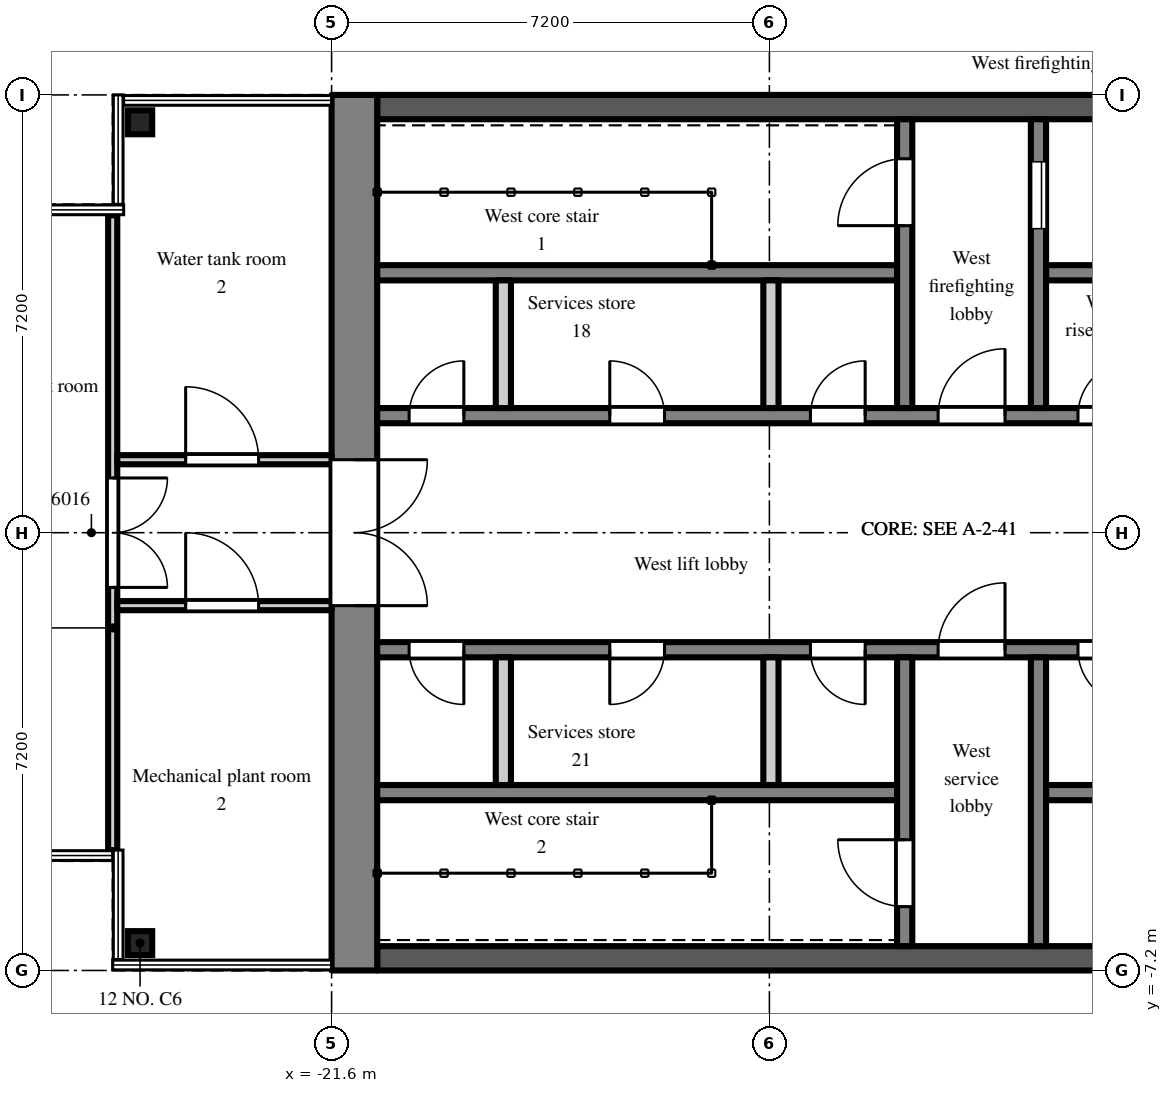
"""IFC4 building model, lengths in metres.
Left out: names, types, materials, properties, quantities, classifications, styles, units other than length and angle.
Written with IfcOpenShell. Run it as: python <this file> out.ifc"""

import sys

from ifc_helpers import new_model, si_unit, direction, frame, frame_2d, origin, origin_2d, place, context, subcontext, project, spatial, polyline, rectangle, i_section, outline, extrude, element, fill, save


model = new_model("IFC4")
c1 = context("Model", 3, precision=1e-05, world=origin(), true_north=direction((0.0, 1.0)))
c2 = subcontext(c1, "Body", "Model", "MODEL_VIEW")
j1 = project(units=[si_unit("LENGTHUNIT", "METRE"), si_unit("PLANEANGLEUNIT", "RADIAN")], contexts=[c1])
p1 = place(None, origin())
s1 = spatial("IfcSite", under=j1, at=p1, CompositionType="ELEMENT")
p2 = place(p1, origin())
s2 = spatial("IfcBuilding", under=s1, at=p2, CompositionType="ELEMENT")
p3 = place(p2, frame((0.0, 0.0, 247.5)))
s3 = spatial("IfcBuildingStorey", under=s2, at=p3, CompositionType="ELEMENT", Elevation=247.5)
for number, where, z_axis, x_axis in (
    (1, (-24.75, -6.75, 0.0), (0.0, 0.0, 1.0), (1.0, 0.0, 0.0)),
    (2, (-24.75, 6.75, 0.0), (0.0, 0.0, 1.0), (1.0, 0.0, 0.0)),
):
    element("IfcColumn", number, at=place(p3, frame(where, z_axis=z_axis, x_axis=x_axis)), inside=s3, PredefinedType="COLUMN", context=c2, shape_type="SweptSolid", body=[
        extrude(i_section(OverallWidth=0.399, OverallDepth=0.394, WebThickness=0.023, FlangeThickness=0.037, FilletRadius=0.015, at=origin_2d()), origin(), (0.0, 0.0, 1.0), 9.812),
    ])
p4 = place(p3, frame((-21.225, -7.2, 0.0), z_axis=(0.0, 0.0, 1.0), x_axis=(0.0, 1.0, 0.0)))
e3 = element("IfcWall", 3, at=p4, inside=s3, PredefinedType="SHEAR", context=c2, shape_type="SweptSolid", body=[
    extrude(outline(polyline([(0.0, 0.0), (14.4, 0.0), (14.4, 10.033), (7.2, 13.7), (0.0, 10.033), (0.0, 0.0)])), frame((0.0, 0.375, 0.0), z_axis=(0.0, -1.0, 0.0), x_axis=(1.0, 0.0, 0.0)), (0.0, 0.0, 1.0), 0.75),
])
p5 = place(p4, frame((6.0, 0.0, 0.0)))
e4 = element("IfcOpeningElement", 4, at=p5, cuts=e3, PredefinedType="OPENING", context=c2, shape_type="SweptSolid", body=[
    extrude(rectangle(XDim=2.4, YDim=2.2, at=frame_2d((1.2, 1.1))), frame((0.0, 0.385, 0.0), z_axis=(0.0, -1.0, 0.0), x_axis=(1.0, 0.0, 0.0)), (0.0, 0.0, 1.0), 0.77),
])
p6 = place(p3, frame((-7.9, 7.0, 0.0), z_axis=(0.0, 0.0, 1.0), x_axis=(-1.0, 0.0, 0.0)))
e5 = element("IfcWall", 5, at=p6, inside=s3, PredefinedType="SHEAR", context=c2, shape_type="SweptSolid", body=[
    extrude(rectangle(XDim=12.95, YDim=0.4, at=frame_2d((6.475, 0.0))), origin(), (0.0, 0.0, 1.0), 10.135),
])
p7 = place(p3, frame((-7.9, 1.925, 0.0), z_axis=(0.0, 0.0, 1.0), x_axis=(-1.0, 0.0, 0.0)))
e6 = element("IfcWall", 6, at=p7, inside=s3, PredefinedType="SHEAR", context=c2, shape_type="SweptSolid", body=[
    extrude(rectangle(XDim=12.95, YDim=0.25, at=frame_2d((6.475, 0.0))), origin(), (0.0, 0.0, 1.0), 12.72),
])
p8 = place(p7, frame((0.525, 0.0, 0.0)))
e7 = element("IfcOpeningElement", 7, at=p8, cuts=e6, PredefinedType="OPENING", context=c2, shape_type="SweptSolid", body=[
    extrude(rectangle(XDim=0.9, YDim=2.1, at=frame_2d((0.45, 1.05))), frame((0.0, 0.135, 0.0), z_axis=(0.0, -1.0, 0.0), x_axis=(1.0, 0.0, 0.0)), (0.0, 0.0, 1.0), 0.27),
])
p9 = place(p7, frame((2.625, 0.0, 0.0)))
e8 = element("IfcOpeningElement", 8, at=p9, cuts=e6, PredefinedType="OPENING", context=c2, shape_type="SweptSolid", body=[
    extrude(rectangle(XDim=1.1, YDim=2.1, at=frame_2d((0.55, 1.05))), frame((0.0, 0.135, 0.0), z_axis=(0.0, -1.0, 0.0), x_axis=(1.0, 0.0, 0.0)), (0.0, 0.0, 1.0), 0.27),
])
p10 = place(p7, frame((4.925, 0.0, 0.0)))
e9 = element("IfcOpeningElement", 9, at=p10, cuts=e6, PredefinedType="OPENING", context=c2, shape_type="SweptSolid", body=[
    extrude(rectangle(XDim=0.9, YDim=2.1, at=frame_2d((0.45, 1.05))), frame((0.0, 0.135, 0.0), z_axis=(0.0, -1.0, 0.0), x_axis=(1.0, 0.0, 0.0)), (0.0, 0.0, 1.0), 0.27),
])
p11 = place(p7, frame((8.225, 0.0, 0.0)))
e10 = element("IfcOpeningElement", 10, at=p11, cuts=e6, PredefinedType="OPENING", context=c2, shape_type="SweptSolid", body=[
    extrude(rectangle(XDim=0.9, YDim=2.1, at=frame_2d((0.45, 1.05))), frame((0.0, 0.135, 0.0), z_axis=(0.0, -1.0, 0.0), x_axis=(1.0, 0.0, 0.0)), (0.0, 0.0, 1.0), 0.27),
])
p12 = place(p7, frame((11.525, 0.0, 0.0)))
e11 = element("IfcOpeningElement", 11, at=p12, cuts=e6, PredefinedType="OPENING", context=c2, shape_type="SweptSolid", body=[
    extrude(rectangle(XDim=0.9, YDim=2.1, at=frame_2d((0.45, 1.05))), frame((0.0, 0.135, 0.0), z_axis=(0.0, -1.0, 0.0), x_axis=(1.0, 0.0, 0.0)), (0.0, 0.0, 1.0), 0.27),
])
p13 = place(p3, frame((-7.9, 4.275, 0.0), z_axis=(0.0, 0.0, 1.0), x_axis=(-1.0, 0.0, 0.0)))
e12 = element("IfcWall", 12, at=p13, inside=s3, PredefinedType="SHEAR", context=c2, shape_type="SweptSolid", body=[
    extrude(rectangle(XDim=1.95, YDim=0.25, at=frame_2d((0.975, 0.0))), origin(), (0.0, 0.0, 1.0), 11.523),
])
p14 = place(p3, frame((-12.3, 4.275, 0.0), z_axis=(0.0, 0.0, 1.0), x_axis=(-1.0, 0.0, 0.0)))
e13 = element("IfcWall", 13, at=p14, inside=s3, PredefinedType="SHEAR", context=c2, shape_type="SweptSolid", body=[
    extrude(rectangle(XDim=8.55, YDim=0.25, at=frame_2d((4.275, 0.0))), origin(), (0.0, 0.0, 1.0), 11.523),
])
p15 = place(p3, frame((-9.975, 2.05, 0.0), z_axis=(0.0, 0.0, 1.0), x_axis=(0.0, 1.0, 0.0)))
e14 = element("IfcWall", 14, at=p15, inside=s3, PredefinedType="SHEAR", context=c2, shape_type="SweptSolid", body=[
    extrude(outline(polyline([(0.0, 0.0), (4.75, 0.0), (4.75, 10.237), (0.0, 12.656), (0.0, 0.0)])), frame((0.0, 0.125, 0.0), z_axis=(0.0, -1.0, 0.0), x_axis=(1.0, 0.0, 0.0)), (0.0, 0.0, 1.0), 0.25),
])
p16 = place(p15, frame((2.95, 0.0, 0.0)))
e15 = element("IfcOpeningElement", 15, at=p16, cuts=e14, PredefinedType="OPENING", context=c2, shape_type="SweptSolid", body=[
    extrude(rectangle(XDim=1.1, YDim=2.1, at=frame_2d((0.55, 1.05))), frame((0.0, 0.135, 0.0), z_axis=(0.0, -1.0, 0.0), x_axis=(1.0, 0.0, 0.0)), (0.0, 0.0, 1.0), 0.27),
])
p17 = place(p3, frame((-12.175, 2.05, 0.0), z_axis=(0.0, 0.0, 1.0), x_axis=(0.0, 1.0, 0.0)))
e16 = element("IfcWall", 16, at=p17, inside=s3, PredefinedType="SHEAR", context=c2, shape_type="SweptSolid", body=[
    extrude(outline(polyline([(0.0, 0.0), (4.75, 0.0), (4.75, 10.237), (0.0, 12.656), (0.0, 0.0)])), frame((0.0, 0.125, 0.0), z_axis=(0.0, -1.0, 0.0), x_axis=(1.0, 0.0, 0.0)), (0.0, 0.0, 1.0), 0.25),
])
p18 = place(p17, frame((3.0, 0.0, 0.0)))
e17 = element("IfcOpeningElement", 17, at=p18, cuts=e16, PredefinedType="OPENING", context=c2, shape_type="SweptSolid", body=[
    extrude(rectangle(XDim=1.1, YDim=2.1, at=frame_2d((0.55, 1.05))), frame((0.0, 0.135, 0.0), z_axis=(0.0, -1.0, 0.0), x_axis=(1.0, 0.0, 0.0)), (0.0, 0.0, 1.0), 0.27),
])
for number, where, z_axis, x_axis in (
    (18, (-14.375, 2.05, 0.0), (0.0, 0.0, 1.0), (0.0, 1.0, 0.0)),
    (19, (-18.775, 2.05, 0.0), (0.0, 0.0, 1.0), (0.0, 1.0, 0.0)),
):
    element("IfcWall", number, at=place(p3, frame(where, z_axis=z_axis, x_axis=x_axis)), inside=s3, PredefinedType="PARTITIONING", context=c2, shape_type="SweptSolid", body=[
        extrude(outline(polyline([(0.0, 0.0), (2.1, 0.0), (2.1, 11.587), (0.0, 12.656), (0.0, 0.0)])), frame((0.0, 0.125, 0.0), z_axis=(0.0, -1.0, 0.0), x_axis=(1.0, 0.0, 0.0)), (0.0, 0.0, 1.0), 0.25),
    ])
p19 = place(p3, frame((-7.9, -7.0, 0.0), z_axis=(0.0, 0.0, 1.0), x_axis=(-1.0, 0.0, 0.0)))
e20 = element("IfcWall", 20, at=p19, inside=s3, PredefinedType="SHEAR", context=c2, shape_type="SweptSolid", body=[
    extrude(rectangle(XDim=12.95, YDim=0.4, at=frame_2d((6.475, 0.0))), origin(), (0.0, 0.0, 1.0), 10.135),
])
p20 = place(p3, frame((-7.9, -1.925, 0.0), z_axis=(0.0, 0.0, 1.0), x_axis=(-1.0, 0.0, 0.0)))
e21 = element("IfcWall", 21, at=p20, inside=s3, PredefinedType="SHEAR", context=c2, shape_type="SweptSolid", body=[
    extrude(rectangle(XDim=12.95, YDim=0.25, at=frame_2d((6.475, 0.0))), origin(), (0.0, 0.0, 1.0), 12.72),
])
p21 = place(p20, frame((0.525, 0.0, 0.0)))
e22 = element("IfcOpeningElement", 22, at=p21, cuts=e21, PredefinedType="OPENING", context=c2, shape_type="SweptSolid", body=[
    extrude(rectangle(XDim=0.9, YDim=2.1, at=frame_2d((0.45, 1.05))), frame((0.0, 0.135, 0.0), z_axis=(0.0, -1.0, 0.0), x_axis=(1.0, 0.0, 0.0)), (0.0, 0.0, 1.0), 0.27),
])
p22 = place(p20, frame((2.625, 0.0, 0.0)))
e23 = element("IfcOpeningElement", 23, at=p22, cuts=e21, PredefinedType="OPENING", context=c2, shape_type="SweptSolid", body=[
    extrude(rectangle(XDim=1.1, YDim=2.1, at=frame_2d((0.55, 1.05))), frame((0.0, 0.135, 0.0), z_axis=(0.0, -1.0, 0.0), x_axis=(1.0, 0.0, 0.0)), (0.0, 0.0, 1.0), 0.27),
])
p23 = place(p20, frame((4.925, 0.0, 0.0)))
e24 = element("IfcOpeningElement", 24, at=p23, cuts=e21, PredefinedType="OPENING", context=c2, shape_type="SweptSolid", body=[
    extrude(rectangle(XDim=0.9, YDim=2.1, at=frame_2d((0.45, 1.05))), frame((0.0, 0.135, 0.0), z_axis=(0.0, -1.0, 0.0), x_axis=(1.0, 0.0, 0.0)), (0.0, 0.0, 1.0), 0.27),
])
p24 = place(p20, frame((8.225, 0.0, 0.0)))
e25 = element("IfcOpeningElement", 25, at=p24, cuts=e21, PredefinedType="OPENING", context=c2, shape_type="SweptSolid", body=[
    extrude(rectangle(XDim=0.9, YDim=2.1, at=frame_2d((0.45, 1.05))), frame((0.0, 0.135, 0.0), z_axis=(0.0, -1.0, 0.0), x_axis=(1.0, 0.0, 0.0)), (0.0, 0.0, 1.0), 0.27),
])
p25 = place(p20, frame((11.525, 0.0, 0.0)))
e26 = element("IfcOpeningElement", 26, at=p25, cuts=e21, PredefinedType="OPENING", context=c2, shape_type="SweptSolid", body=[
    extrude(rectangle(XDim=0.9, YDim=2.1, at=frame_2d((0.45, 1.05))), frame((0.0, 0.135, 0.0), z_axis=(0.0, -1.0, 0.0), x_axis=(1.0, 0.0, 0.0)), (0.0, 0.0, 1.0), 0.27),
])
p26 = place(p3, frame((-7.9, -4.275, 0.0), z_axis=(0.0, 0.0, 1.0), x_axis=(-1.0, 0.0, 0.0)))
e27 = element("IfcWall", 27, at=p26, inside=s3, PredefinedType="SHEAR", context=c2, shape_type="SweptSolid", body=[
    extrude(rectangle(XDim=1.95, YDim=0.25, at=frame_2d((0.975, 0.0))), origin(), (0.0, 0.0, 1.0), 11.523),
])
p27 = place(p3, frame((-12.3, -4.275, 0.0), z_axis=(0.0, 0.0, 1.0), x_axis=(-1.0, 0.0, 0.0)))
e28 = element("IfcWall", 28, at=p27, inside=s3, PredefinedType="SHEAR", context=c2, shape_type="SweptSolid", body=[
    extrude(rectangle(XDim=8.55, YDim=0.25, at=frame_2d((4.275, 0.0))), origin(), (0.0, 0.0, 1.0), 11.523),
])
p28 = place(p3, frame((-9.975, -2.05, 0.0), z_axis=(0.0, 0.0, 1.0), x_axis=(0.0, -1.0, 0.0)))
e29 = element("IfcWall", 29, at=p28, inside=s3, PredefinedType="SHEAR", context=c2, shape_type="SweptSolid", body=[
    extrude(outline(polyline([(0.0, 0.0), (4.75, 0.0), (4.75, 10.237), (0.0, 12.656), (0.0, 0.0)])), frame((0.0, 0.125, 0.0), z_axis=(0.0, -1.0, 0.0), x_axis=(1.0, 0.0, 0.0)), (0.0, 0.0, 1.0), 0.25),
])
p29 = place(p3, frame((-12.175, -2.05, 0.0), z_axis=(0.0, 0.0, 1.0), x_axis=(0.0, -1.0, 0.0)))
e30 = element("IfcWall", 30, at=p29, inside=s3, PredefinedType="SHEAR", context=c2, shape_type="SweptSolid", body=[
    extrude(outline(polyline([(0.0, 0.0), (4.75, 0.0), (4.75, 10.237), (0.0, 12.656), (0.0, 0.0)])), frame((0.0, 0.125, 0.0), z_axis=(0.0, -1.0, 0.0), x_axis=(1.0, 0.0, 0.0)), (0.0, 0.0, 1.0), 0.25),
])
p30 = place(p29, frame((3.0, 0.0, 0.0)))
e31 = element("IfcOpeningElement", 31, at=p30, cuts=e30, PredefinedType="OPENING", context=c2, shape_type="SweptSolid", body=[
    extrude(rectangle(XDim=1.1, YDim=2.1, at=frame_2d((0.55, 1.05))), frame((0.0, 0.135, 0.0), z_axis=(0.0, -1.0, 0.0), x_axis=(1.0, 0.0, 0.0)), (0.0, 0.0, 1.0), 0.27),
])
for number, where, z_axis, x_axis in (
    (32, (-14.375, -2.05, 0.0), (0.0, 0.0, 1.0), (0.0, -1.0, 0.0)),
    (33, (-18.775, -2.05, 0.0), (0.0, 0.0, 1.0), (0.0, -1.0, 0.0)),
):
    element("IfcWall", number, at=place(p3, frame(where, z_axis=z_axis, x_axis=x_axis)), inside=s3, PredefinedType="PARTITIONING", context=c2, shape_type="SweptSolid", body=[
        extrude(outline(polyline([(0.0, 0.0), (2.1, 0.0), (2.1, 11.587), (0.0, 12.656), (0.0, 0.0)])), frame((0.0, 0.125, 0.0), z_axis=(0.0, -1.0, 0.0), x_axis=(1.0, 0.0, 0.0)), (0.0, 0.0, 1.0), 0.25),
    ])
p31 = place(p3, frame((-25.2, -5.22, 0.0), z_axis=(0.0, 0.0, 1.0), x_axis=(0.0, 1.0, 0.0)))
e34 = element("IfcWall", 34, at=p31, inside=s3, PredefinedType="PARTITIONING", context=c2, shape_type="SweptSolid", body=[
    extrude(rectangle(XDim=10.44, YDim=0.15, at=frame_2d((5.22, 0.0))), origin(), (0.0, 0.0, 1.0), 2.7),
])
p32 = place(p31, frame((4.32, 0.0, 0.0)))
e35 = element("IfcOpeningElement", 35, at=p32, cuts=e34, PredefinedType="OPENING", context=c2, shape_type="SweptSolid", body=[
    extrude(rectangle(XDim=1.8, YDim=2.1, at=frame_2d((0.9, 1.05))), frame((0.0, 0.085, 0.0), z_axis=(0.0, -1.0, 0.0), x_axis=(1.0, 0.0, 0.0)), (0.0, 0.0, 1.0), 0.17),
])
p33 = place(p3, frame((-25.125, -1.2, 0.0), z_axis=(0.0, 0.0, 1.0), x_axis=(1.0, 0.0, 0.0)))
e36 = element("IfcWall", 36, at=p33, inside=s3, PredefinedType="PARTITIONING", context=c2, shape_type="SweptSolid", body=[
    extrude(rectangle(XDim=3.525, YDim=0.15, at=frame_2d((1.762, 0.0))), origin(), (0.0, 0.0, 1.0), 2.7),
])
p34 = place(p33, frame((1.125, 0.0, 0.0)))
e37 = element("IfcOpeningElement", 37, at=p34, cuts=e36, PredefinedType="OPENING", context=c2, shape_type="SweptSolid", body=[
    extrude(rectangle(XDim=1.2, YDim=2.1, at=frame_2d((0.6, 1.05))), frame((0.0, 0.085, 0.0), z_axis=(0.0, -1.0, 0.0), x_axis=(1.0, 0.0, 0.0)), (0.0, 0.0, 1.0), 0.17),
])
p35 = place(p3, frame((-25.125, 1.2, 0.0), z_axis=(0.0, 0.0, 1.0), x_axis=(1.0, 0.0, 0.0)))
e38 = element("IfcWall", 38, at=p35, inside=s3, PredefinedType="PARTITIONING", context=c2, shape_type="SweptSolid", body=[
    extrude(rectangle(XDim=3.525, YDim=0.15, at=frame_2d((1.762, 0.0))), origin(), (0.0, 0.0, 1.0), 2.7),
])
p36 = place(p35, frame((1.125, 0.0, 0.0)))
e39 = element("IfcOpeningElement", 39, at=p36, cuts=e38, PredefinedType="OPENING", context=c2, shape_type="SweptSolid", body=[
    extrude(rectangle(XDim=1.2, YDim=2.1, at=frame_2d((0.6, 1.05))), frame((0.0, 0.085, 0.0), z_axis=(0.0, -1.0, 0.0), x_axis=(1.0, 0.0, 0.0)), (0.0, 0.0, 1.0), 0.17),
])
p37 = place(p16, origin())
e40 = element("IfcDoor", 40, at=p37, inside=s3, OperationType="SLIDING_TO_LEFT", PredefinedType="DOOR", context=c2, shape_type="SweptSolid", body=[
    extrude(rectangle(XDim=1.1, YDim=2.1, at=frame_2d((0.55, 1.05))), frame((0.0, 0.025, 0.0), z_axis=(0.0, -1.0, 0.0), x_axis=(1.0, 0.0, 0.0)), (0.0, 0.0, 1.0), 0.05),
])
fill(e15, e40)
p38 = place(p18, origin())
e41 = element("IfcDoor", 41, at=p38, inside=s3, OperationType="SINGLE_SWING_LEFT", PredefinedType="DOOR", context=c2, shape_type="SweptSolid", body=[
    extrude(rectangle(XDim=1.1, YDim=2.1, at=frame_2d((0.55, 1.05))), frame((0.0, 0.025, 0.0), z_axis=(0.0, -1.0, 0.0), x_axis=(1.0, 0.0, 0.0)), (0.0, 0.0, 1.0), 0.05),
])
fill(e17, e41)
p39 = place(p30, frame((1.1, 0.0, 0.0), z_axis=(0.0, 0.0, 1.0), x_axis=(-1.0, 0.0, 0.0)))
e42 = element("IfcDoor", 42, at=p39, inside=s3, OperationType="SINGLE_SWING_RIGHT", PredefinedType="DOOR", context=c2, shape_type="SweptSolid", body=[
    extrude(rectangle(XDim=1.1, YDim=2.1, at=frame_2d((0.55, 1.05))), frame((0.0, 0.025, 0.0), z_axis=(0.0, -1.0, 0.0), x_axis=(1.0, 0.0, 0.0)), (0.0, 0.0, 1.0), 0.05),
])
fill(e31, e42)
p40 = place(p8, frame((0.9, 0.0, 0.0), z_axis=(0.0, 0.0, 1.0), x_axis=(-1.0, 0.0, 0.0)))
e43 = element("IfcDoor", 43, at=p40, inside=s3, OperationType="SINGLE_SWING_RIGHT", PredefinedType="DOOR", context=c2, shape_type="SweptSolid", body=[
    extrude(rectangle(XDim=0.9, YDim=2.1, at=frame_2d((0.45, 1.05))), frame((0.0, 0.025, 0.0), z_axis=(0.0, -1.0, 0.0), x_axis=(1.0, 0.0, 0.0)), (0.0, 0.0, 1.0), 0.05),
])
fill(e7, e43)
p41 = place(p21, origin())
e44 = element("IfcDoor", 44, at=p41, inside=s3, OperationType="SINGLE_SWING_LEFT", PredefinedType="DOOR", context=c2, shape_type="SweptSolid", body=[
    extrude(rectangle(XDim=0.9, YDim=2.1, at=frame_2d((0.45, 1.05))), frame((0.0, 0.025, 0.0), z_axis=(0.0, -1.0, 0.0), x_axis=(1.0, 0.0, 0.0)), (0.0, 0.0, 1.0), 0.05),
])
fill(e22, e44)
p42 = place(p9, frame((1.1, 0.0, 0.0), z_axis=(0.0, 0.0, 1.0), x_axis=(-1.0, 0.0, 0.0)))
e45 = element("IfcDoor", 45, at=p42, inside=s3, OperationType="SINGLE_SWING_RIGHT", PredefinedType="DOOR", context=c2, shape_type="SweptSolid", body=[
    extrude(rectangle(XDim=1.1, YDim=2.1, at=frame_2d((0.55, 1.05))), frame((0.0, 0.025, 0.0), z_axis=(0.0, -1.0, 0.0), x_axis=(1.0, 0.0, 0.0)), (0.0, 0.0, 1.0), 0.05),
])
fill(e8, e45)
p43 = place(p22, frame((1.1, 0.0, 0.0), z_axis=(0.0, 0.0, 1.0), x_axis=(-1.0, 0.0, 0.0)))
e46 = element("IfcDoor", 46, at=p43, inside=s3, OperationType="SINGLE_SWING_RIGHT", PredefinedType="DOOR", context=c2, shape_type="SweptSolid", body=[
    extrude(rectangle(XDim=1.1, YDim=2.1, at=frame_2d((0.55, 1.05))), frame((0.0, 0.025, 0.0), z_axis=(0.0, -1.0, 0.0), x_axis=(1.0, 0.0, 0.0)), (0.0, 0.0, 1.0), 0.05),
])
fill(e23, e46)
p44 = place(p5, frame((2.4, 0.0, 0.0), z_axis=(0.0, 0.0, 1.0), x_axis=(-1.0, 0.0, 0.0)))
e47 = element("IfcDoor", 47, at=p44, inside=s3, OperationType="DOUBLE_DOOR_DOUBLE_SWING", PredefinedType="DOOR", context=c2, shape_type="SweptSolid", body=[
    extrude(rectangle(XDim=2.4, YDim=2.2, at=frame_2d((1.2, 1.1))), frame((0.0, 0.025, 0.0), z_axis=(0.0, -1.0, 0.0), x_axis=(1.0, 0.0, 0.0)), (0.0, 0.0, 1.0), 0.05),
])
fill(e4, e47)
p45 = place(p10, frame((0.9, 0.0, 0.0), z_axis=(0.0, 0.0, 1.0), x_axis=(-1.0, 0.0, 0.0)))
e48 = element("IfcDoor", 48, at=p45, inside=s3, OperationType="SINGLE_SWING_RIGHT", PredefinedType="DOOR", context=c2, shape_type="SweptSolid", body=[
    extrude(rectangle(XDim=0.9, YDim=2.1, at=frame_2d((0.45, 1.05))), frame((0.0, 0.025, 0.0), z_axis=(0.0, -1.0, 0.0), x_axis=(1.0, 0.0, 0.0)), (0.0, 0.0, 1.0), 0.05),
])
fill(e9, e48)
p46 = place(p11, frame((0.9, 0.0, 0.0), z_axis=(0.0, 0.0, 1.0), x_axis=(-1.0, 0.0, 0.0)))
e49 = element("IfcDoor", 49, at=p46, inside=s3, OperationType="SINGLE_SWING_LEFT", PredefinedType="DOOR", context=c2, shape_type="SweptSolid", body=[
    extrude(rectangle(XDim=0.9, YDim=2.1, at=frame_2d((0.45, 1.05))), frame((0.0, 0.025, 0.0), z_axis=(0.0, -1.0, 0.0), x_axis=(1.0, 0.0, 0.0)), (0.0, 0.0, 1.0), 0.05),
])
fill(e10, e49)
p47 = place(p12, frame((0.9, 0.0, 0.0), z_axis=(0.0, 0.0, 1.0), x_axis=(-1.0, 0.0, 0.0)))
e50 = element("IfcDoor", 50, at=p47, inside=s3, OperationType="SINGLE_SWING_RIGHT", PredefinedType="DOOR", context=c2, shape_type="SweptSolid", body=[
    extrude(rectangle(XDim=0.9, YDim=2.1, at=frame_2d((0.45, 1.05))), frame((0.0, 0.025, 0.0), z_axis=(0.0, -1.0, 0.0), x_axis=(1.0, 0.0, 0.0)), (0.0, 0.0, 1.0), 0.05),
])
fill(e11, e50)
p48 = place(p23, origin())
e51 = element("IfcDoor", 51, at=p48, inside=s3, OperationType="SINGLE_SWING_LEFT", PredefinedType="DOOR", context=c2, shape_type="SweptSolid", body=[
    extrude(rectangle(XDim=0.9, YDim=2.1, at=frame_2d((0.45, 1.05))), frame((0.0, 0.025, 0.0), z_axis=(0.0, -1.0, 0.0), x_axis=(1.0, 0.0, 0.0)), (0.0, 0.0, 1.0), 0.05),
])
fill(e24, e51)
p49 = place(p24, origin())
e52 = element("IfcDoor", 52, at=p49, inside=s3, OperationType="SINGLE_SWING_RIGHT", PredefinedType="DOOR", context=c2, shape_type="SweptSolid", body=[
    extrude(rectangle(XDim=0.9, YDim=2.1, at=frame_2d((0.45, 1.05))), frame((0.0, 0.025, 0.0), z_axis=(0.0, -1.0, 0.0), x_axis=(1.0, 0.0, 0.0)), (0.0, 0.0, 1.0), 0.05),
])
fill(e25, e52)
p50 = place(p25, origin())
e53 = element("IfcDoor", 53, at=p50, inside=s3, OperationType="SINGLE_SWING_LEFT", PredefinedType="DOOR", context=c2, shape_type="SweptSolid", body=[
    extrude(rectangle(XDim=0.9, YDim=2.1, at=frame_2d((0.45, 1.05))), frame((0.0, 0.025, 0.0), z_axis=(0.0, -1.0, 0.0), x_axis=(1.0, 0.0, 0.0)), (0.0, 0.0, 1.0), 0.05),
])
fill(e26, e53)
p51 = place(p32, frame((1.8, 0.0, 0.0), z_axis=(0.0, 0.0, 1.0), x_axis=(-1.0, 0.0, 0.0)))
e54 = element("IfcDoor", 54, at=p51, inside=s3, OperationType="DOUBLE_DOOR_DOUBLE_SWING", PredefinedType="DOOR", context=c2, shape_type="SweptSolid", body=[
    extrude(rectangle(XDim=1.8, YDim=2.1, at=frame_2d((0.9, 1.05))), frame((0.0, 0.025, 0.0), z_axis=(0.0, -1.0, 0.0), x_axis=(1.0, 0.0, 0.0)), (0.0, 0.0, 1.0), 0.05),
])
fill(e35, e54)
p52 = place(p34, origin())
e55 = element("IfcDoor", 55, at=p52, inside=s3, OperationType="SINGLE_SWING_LEFT", PredefinedType="DOOR", context=c2, shape_type="SweptSolid", body=[
    extrude(rectangle(XDim=1.2, YDim=2.1, at=frame_2d((0.6, 1.05))), frame((0.0, 0.025, 0.0), z_axis=(0.0, -1.0, 0.0), x_axis=(1.0, 0.0, 0.0)), (0.0, 0.0, 1.0), 0.05),
])
fill(e37, e55)
p53 = place(p36, origin())
e56 = element("IfcDoor", 56, at=p53, inside=s3, OperationType="SINGLE_SWING_LEFT", PredefinedType="DOOR", context=c2, shape_type="SweptSolid", body=[
    extrude(rectangle(XDim=1.2, YDim=2.1, at=frame_2d((0.6, 1.05))), frame((0.0, 0.025, 0.0), z_axis=(0.0, -1.0, 0.0), x_axis=(1.0, 0.0, 0.0)), (0.0, 0.0, 1.0), 0.05),
])
fill(e39, e56)
save(model, sys.argv[1])
